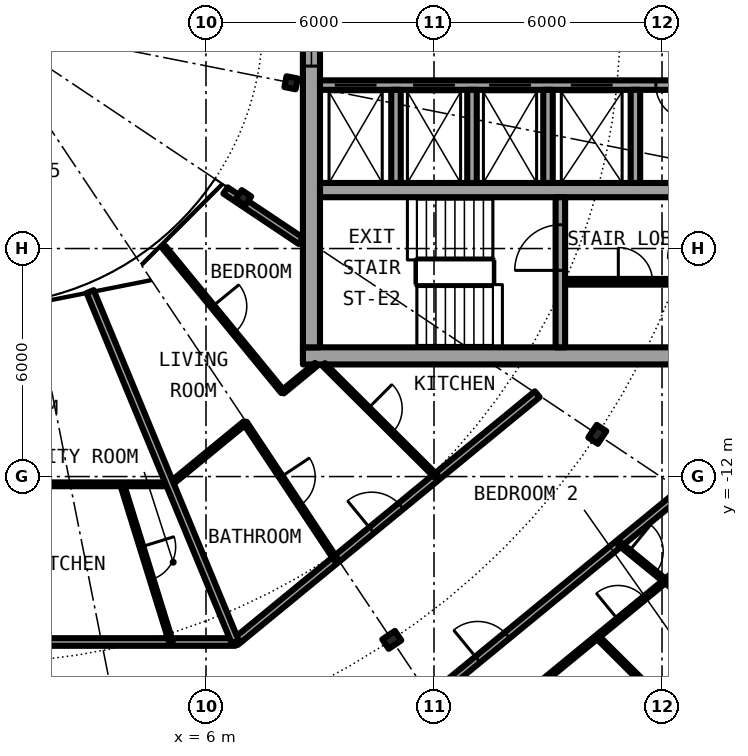
"""IFC4 building model, lengths in metres.
Left out: names, types, materials, properties, quantities, classifications, styles, units other than length and angle.
Written with IfcOpenShell. Run it as: python <this file> out.ifc"""

import sys

from ifc_helpers import new_model, si_unit, direction, frame, frame_2d, origin, origin_2d, place, context, subcontext, project, spatial, rectangle, i_section, extrude, element, fill, save


model = new_model("IFC4")
c1 = context("Model", 3, precision=1e-05, world=origin(), true_north=direction((0.0, 1.0)))
c2 = subcontext(c1, "Body", "Model", "MODEL_VIEW")
j1 = project(units=[si_unit("LENGTHUNIT", "METRE"), si_unit("PLANEANGLEUNIT", "RADIAN")], contexts=[c1])
p1 = place(None, origin())
s1 = spatial("IfcSite", under=j1, at=p1, CompositionType="ELEMENT")
p2 = place(p1, origin())
s2 = spatial("IfcBuilding", under=s1, at=p2, CompositionType="ELEMENT")
p3 = place(p2, frame((0.0, 0.0, 202.4)))
s3 = spatial("IfcBuildingStorey", under=s2, at=p3, CompositionType="ELEMENT", Elevation=202.4)
for number, where, z_axis, x_axis in (
    (1, (10.889, -16.297, 0.0), (0.0, 0.0, 1.0), (0.556, -0.831, 0.0)),
    (2, (16.297, -10.889, 0.0), (0.0, 0.0, 1.0), (0.831, -0.556, 0.0)),
):
    element("IfcColumn", number, at=place(p3, frame(where, z_axis=z_axis, x_axis=x_axis)), inside=s3, PredefinedType="COLUMN", context=c2, shape_type="SweptSolid", body=[
        extrude(i_section(OverallWidth=0.3, OverallDepth=0.4, WebThickness=0.013, FlangeThickness=0.024, FilletRadius=0.027, at=origin_2d()), origin(), (0.0, 0.0, 1.0), 3.05),
    ])
for number, where, z_axis, x_axis in (
    (3, (6.984, -4.667, 0.0), (0.0, 0.0, 1.0), (0.831, -0.556, 0.0)),
    (4, (8.239, -1.639, 0.0), (0.0, 0.0, 1.0), (0.981, -0.195, 0.0)),
):
    element("IfcColumn", number, at=place(p3, frame(where, z_axis=z_axis, x_axis=x_axis)), inside=s3, PredefinedType="COLUMN", context=c2, shape_type="SweptSolid", body=[
        extrude(i_section(OverallWidth=0.3, OverallDepth=0.29, WebThickness=0.009, FlangeThickness=0.014, FilletRadius=0.027, at=origin_2d()), origin(), (0.0, 0.0, 1.0), 3.05),
    ])
p4 = place(p3, frame((8.55, -8.825, 0.0), z_axis=(0.0, 0.0, 1.0), x_axis=(1.0, 0.0, 0.0)))
e5 = element("IfcWall", 5, at=p4, inside=s3, PredefinedType="SHEAR", context=c2, shape_type="SweptSolid", body=[
    extrude(rectangle(XDim=13.5, YDim=0.45, at=frame_2d((6.75, 0.0))), origin(), (0.0, 0.0, 1.0), 3.05),
])
p5 = place(p4, frame((11.325, 0.0, 0.0)))
e6 = element("IfcOpeningElement", 6, at=p5, cuts=e5, PredefinedType="OPENING", context=c2, shape_type="SweptSolid", body=[
    extrude(rectangle(XDim=1.2, YDim=2.3, at=frame_2d((0.6, 1.15))), frame((0.0, 0.235, 0.0), z_axis=(0.0, -1.0, 0.0), x_axis=(1.0, 0.0, 0.0)), (0.0, 0.0, 1.0), 0.47),
])
p6 = place(p3, frame((8.775, -8.6, 0.0), z_axis=(0.0, 0.0, 1.0), x_axis=(0.0, 1.0, 0.0)))
e7 = element("IfcWall", 7, at=p6, inside=s3, PredefinedType="SHEAR", context=c2, shape_type="SweptSolid", body=[
    extrude(rectangle(XDim=17.2, YDim=0.45, at=frame_2d((8.6, 0.0))), origin(), (0.0, 0.0, 1.0), 3.05),
])
p7 = place(p6, frame((7.4, 0.0, 0.1)))
e8 = element("IfcOpeningElement", 8, at=p7, cuts=e7, PredefinedType="OPENING", context=c2, shape_type="SweptSolid", body=[
    extrude(rectangle(XDim=2.4, YDim=2.2, at=frame_2d((1.2, 1.1))), frame((0.0, 0.235, 0.0), z_axis=(0.0, -1.0, 0.0), x_axis=(1.0, 0.0, 0.0)), (0.0, 0.0, 1.0), 0.47),
])
p8 = place(p3, frame((19.15, -1.7, 0.0), z_axis=(0.0, 0.0, 1.0), x_axis=(-1.0, 0.0, 0.0)))
e9 = element("IfcWall", 9, at=p8, inside=s3, PredefinedType="SHEAR", context=c2, shape_type="SweptSolid", body=[
    extrude(rectangle(XDim=10.15, YDim=0.25, at=frame_2d((5.075, 0.0))), origin(), (0.0, 0.0, 1.0), 3.05),
])
p9 = place(p8, frame((8.663, 0.0, 0.0)))
e10 = element("IfcOpeningElement", 10, at=p9, cuts=e9, PredefinedType="OPENING", context=c2, shape_type="SweptSolid", body=[
    extrude(rectangle(XDim=1.1, YDim=2.3, at=frame_2d((0.55, 1.15))), frame((0.0, 0.135, 0.0), z_axis=(0.0, -1.0, 0.0), x_axis=(1.0, 0.0, 0.0)), (0.0, 0.0, 1.0), 0.27),
])
p10 = place(p8, frame((6.6, 0.0, 0.0)))
e11 = element("IfcOpeningElement", 11, at=p10, cuts=e9, PredefinedType="OPENING", context=c2, shape_type="SweptSolid", body=[
    extrude(rectangle(XDim=1.1, YDim=2.3, at=frame_2d((0.55, 1.15))), frame((0.0, 0.135, 0.0), z_axis=(0.0, -1.0, 0.0), x_axis=(1.0, 0.0, 0.0)), (0.0, 0.0, 1.0), 0.27),
])
p11 = place(p8, frame((4.6, 0.0, 0.0)))
e12 = element("IfcOpeningElement", 12, at=p11, cuts=e9, PredefinedType="OPENING", context=c2, shape_type="SweptSolid", body=[
    extrude(rectangle(XDim=1.1, YDim=2.3, at=frame_2d((0.55, 1.15))), frame((0.0, 0.135, 0.0), z_axis=(0.0, -1.0, 0.0), x_axis=(1.0, 0.0, 0.0)), (0.0, 0.0, 1.0), 0.27),
])
p12 = place(p8, frame((2.45, 0.0, 0.0)))
e13 = element("IfcOpeningElement", 13, at=p12, cuts=e9, PredefinedType="OPENING", context=c2, shape_type="SweptSolid", body=[
    extrude(rectangle(XDim=1.1, YDim=2.3, at=frame_2d((0.55, 1.15))), frame((0.0, 0.135, 0.0), z_axis=(0.0, -1.0, 0.0), x_axis=(1.0, 0.0, 0.0)), (0.0, 0.0, 1.0), 0.27),
])
p13 = place(p8, frame((0.413, 0.0, 0.0)))
e14 = element("IfcOpeningElement", 14, at=p13, cuts=e9, PredefinedType="OPENING", context=c2, shape_type="SweptSolid", body=[
    extrude(rectangle(XDim=0.9, YDim=2.3, at=frame_2d((0.45, 1.15))), frame((0.0, 0.135, 0.0), z_axis=(0.0, -1.0, 0.0), x_axis=(1.0, 0.0, 0.0)), (0.0, 0.0, 1.0), 0.27),
])
p14 = place(p3, frame((9.0, -4.462, 0.0), z_axis=(0.0, 0.0, 1.0), x_axis=(1.0, 0.0, 0.0)))
e15 = element("IfcWall", 15, at=p14, inside=s3, PredefinedType="SHEAR", context=c2, shape_type="SweptSolid", body=[
    extrude(rectangle(XDim=10.15, YDim=0.375, at=frame_2d((5.075, 0.0))), origin(), (0.0, 0.0, 1.0), 3.05),
])
p15 = place(p3, frame((15.325, -8.6, 0.0), z_axis=(0.0, 0.0, 1.0), x_axis=(0.0, 1.0, 0.0)))
e16 = element("IfcWall", 16, at=p15, inside=s3, PredefinedType="SHEAR", context=c2, shape_type="SweptSolid", body=[
    extrude(rectangle(XDim=3.95, YDim=0.25, at=frame_2d((1.975, 0.0))), origin(), (0.0, 0.0, 1.0), 3.05),
])
p16 = place(p15, frame((2.025, 0.0, 0.0)))
e17 = element("IfcOpeningElement", 17, at=p16, cuts=e16, PredefinedType="OPENING", context=c2, shape_type="SweptSolid", body=[
    extrude(rectangle(XDim=1.2, YDim=2.3, at=frame_2d((0.6, 1.15))), frame((0.0, 0.135, 0.0), z_axis=(0.0, -1.0, 0.0), x_axis=(1.0, 0.0, 0.0)), (0.0, 0.0, 1.0), 0.27),
])
for number, where, z_axis, x_axis in (
    (18, (15.0, -1.825, 0.0), (0.0, 0.0, 1.0), (0.0, -1.0, 0.0)),
    (19, (17.3, -1.825, 0.0), (0.0, 0.0, 1.0), (0.0, -1.0, 0.0)),
    (20, (11.0, -1.825, 0.0), (0.0, 0.0, 1.0), (0.0, -1.0, 0.0)),
    (21, (13.0, -1.825, 0.0), (0.0, 0.0, 1.0), (0.0, -1.0, 0.0)),
):
    element("IfcWall", number, at=place(p3, frame(where, z_axis=z_axis, x_axis=x_axis)), inside=s3, PredefinedType="SOLIDWALL", context=c2, shape_type="SweptSolid", body=[
        extrude(rectangle(XDim=2.45, YDim=0.25, at=frame_2d((1.225, 0.0))), origin(), (0.0, 0.0, 1.0), 2.7),
    ])
p17 = place(p3, frame((15.45, -6.875, 0.0), z_axis=(0.0, 0.0, 1.0), x_axis=(1.0, 0.0, 0.0)))
e22 = element("IfcWall", 22, at=p17, inside=s3, PredefinedType="PARTITIONING", context=c2, shape_type="SweptSolid", body=[
    extrude(rectangle(XDim=3.7, YDim=0.15, at=frame_2d((1.85, 0.0))), origin(), (0.0, 0.0, 1.0), 2.7),
])
p18 = place(p17, frame((1.4, 0.0, 0.0)))
e23 = element("IfcOpeningElement", 23, at=p18, cuts=e22, PredefinedType="OPENING", context=c2, shape_type="SweptSolid", body=[
    extrude(rectangle(XDim=0.9, YDim=2.3, at=frame_2d((0.45, 1.15))), frame((0.0, 0.085, 0.0), z_axis=(0.0, -1.0, 0.0), x_axis=(1.0, 0.0, 0.0)), (0.0, 0.0, 1.0), 0.17),
])
p19 = place(p3, frame((14.507, -17.682, 0.0), z_axis=(0.0, 0.0, 1.0), x_axis=(0.773143248755, 0.634231437966, 0.0)))
e24 = element("IfcWall", 24, at=p19, inside=s3, PredefinedType="PARTITIONING", context=c2, shape_type="SweptSolid", body=[
    extrude(rectangle(XDim=6.94, YDim=0.1, at=frame_2d((3.47, 0.0))), origin(), (0.0, 0.0, 1.0), 2.7),
])
p20 = place(p19, frame((3.021, 0.0, 0.0)))
e25 = element("IfcOpeningElement", 25, at=p20, cuts=e24, PredefinedType="OPENING", context=c2, shape_type="SweptSolid", body=[
    extrude(rectangle(XDim=0.9, YDim=2.3, at=frame_2d((0.45, 1.15))), frame((0.0, 0.06, 0.0), z_axis=(0.0, -1.0, 0.0), x_axis=(1.0, 0.0, 0.0)), (0.0, 0.0, 1.0), 0.12),
])
p21 = place(p3, frame((8.534, -20.603, 0.0), z_axis=(0.0, 0.0, 1.0), x_axis=(0.772983503654, 0.634426121056, 0.0)))
e26 = element("IfcWall", 26, at=p21, inside=s3, PredefinedType="PARTITIONING", context=c2, shape_type="SweptSolid", body=[
    extrude(rectangle(XDim=12.947, YDim=0.2, at=frame_2d((6.474, 0.0))), origin(), (0.0, 0.0, 1.0), 2.7),
])
p22 = place(p21, frame((5.974, 0.0, 0.0)))
e27 = element("IfcOpeningElement", 27, at=p22, cuts=e26, PredefinedType="OPENING", context=c2, shape_type="SweptSolid", body=[
    extrude(rectangle(XDim=1.0, YDim=2.3, at=frame_2d((0.5, 1.15))), frame((0.0, 0.11, 0.0), z_axis=(0.0, -1.0, 0.0), x_axis=(1.0, 0.0, 0.0)), (0.0, 0.0, 1.0), 0.22),
])
p23 = place(p3, frame((6.773, -16.353, 0.0), z_axis=(0.0, 0.0, 1.0), x_axis=(0.773034536097, 0.634363938131, 0.0)))
e28 = element("IfcWall", 28, at=p23, inside=s3, PredefinedType="PARTITIONING", context=c2, shape_type="SweptSolid", body=[
    extrude(rectangle(XDim=10.277, YDim=0.2, at=frame_2d((5.138, 0.0))), origin(), (0.0, 0.0, 1.0), 2.7),
])
p24 = place(p23, frame((4.638, 0.0, 0.0)))
e29 = element("IfcOpeningElement", 29, at=p24, cuts=e28, PredefinedType="OPENING", context=c2, shape_type="SweptSolid", body=[
    extrude(rectangle(XDim=1.0, YDim=2.3, at=frame_2d((0.5, 1.15))), frame((0.0, 0.11, 0.0), z_axis=(0.0, -1.0, 0.0), x_axis=(1.0, 0.0, 0.0)), (0.0, 0.0, 1.0), 0.22),
])
p25 = place(p3, frame((-6.773, -16.353, 0.0), z_axis=(0.0, 0.0, 1.0), x_axis=(1.0, 0.0, 0.0)))
e30 = element("IfcWall", 30, at=p25, inside=s3, PredefinedType="PARTITIONING", context=c2, shape_type="SweptSolid", body=[
    extrude(rectangle(XDim=13.546, YDim=0.2, at=frame_2d((6.773, 0.0))), origin(), (0.0, 0.0, 1.0), 2.7),
])
p26 = place(p25, frame((4.579, 0.0, 0.0)))
e31 = element("IfcOpeningElement", 31, at=p26, cuts=e30, PredefinedType="OPENING", context=c2, shape_type="SweptSolid", body=[
    extrude(rectangle(XDim=1.0, YDim=2.3, at=frame_2d((0.5, 1.15))), frame((0.0, 0.11, 0.0), z_axis=(0.0, -1.0, 0.0), x_axis=(1.0, 0.0, 0.0)), (0.0, 0.0, 1.0), 0.22),
])
p27 = place(p3, frame((5.055, -12.204, 0.0), z_axis=(0.0, 0.0, 1.0), x_axis=(0.772943675046, 0.634474645046, 0.0)))
e32 = element("IfcWall", 32, at=p27, inside=s3, PredefinedType="PARTITIONING", context=c2, shape_type="SweptSolid", body=[
    extrude(rectangle(XDim=2.557, YDim=0.1, at=frame_2d((1.278, 0.0))), origin(), (0.0, 0.0, 1.0), 2.7),
])
p28 = place(p3, frame((8.017, -9.773, 0.0), z_axis=(0.0, 0.0, 1.0), x_axis=(0.772786083133, 0.634666581534, 0.0)))
e33 = element("IfcWall", 33, at=p28, inside=s3, PredefinedType="PARTITIONING", context=c2, shape_type="SweptSolid", body=[
    extrude(rectangle(XDim=1.144, YDim=0.1, at=frame_2d((0.572, 0.0))), origin(), (0.0, 0.0, 1.0), 2.7),
])
p29 = place(p3, frame((-1.264, -12.204, 0.0), z_axis=(0.0, 0.0, 1.0), x_axis=(1.0, 0.0, 0.0)))
e34 = element("IfcWall", 34, at=p29, inside=s3, PredefinedType="PARTITIONING", context=c2, shape_type="SweptSolid", body=[
    extrude(rectangle(XDim=6.319, YDim=0.1, at=frame_2d((3.159, 0.0))), origin(), (0.0, 0.0, 1.0), 2.7),
])
p30 = place(p3, frame((6.513, -4.472, 0.0), z_axis=(0.0, 0.0, 1.0), x_axis=(0.831403409976, -0.555669299026, 0.0)))
e35 = element("IfcWall", 35, at=p30, inside=s3, PredefinedType="PARTITIONING", context=c2, shape_type="SweptSolid", body=[
    extrude(rectangle(XDim=2.383, YDim=0.2, at=frame_2d((1.191, 0.0))), origin(), (0.0, 0.0, 1.0), 2.7),
])
p31 = place(p3, frame((2.952, -7.133, 0.0), z_axis=(0.0, 0.0, 1.0), x_axis=(0.382570007985, -0.923926506271, 0.0)))
e36 = element("IfcWall", 36, at=p31, inside=s3, PredefinedType="PARTITIONING", context=c2, shape_type="SweptSolid", body=[
    extrude(rectangle(XDim=9.98, YDim=0.2, at=frame_2d((4.99, 0.0))), origin(), (0.0, 0.0, 1.0), 2.7),
])
p32 = place(p3, frame((3.791, -12.204, 0.0), z_axis=(0.0, 0.0, 1.0), x_axis=(0.29670674532, -0.954968642041, 0.0)))
e37 = element("IfcWall", 37, at=p32, inside=s3, PredefinedType="PARTITIONING", context=c2, shape_type="SweptSolid", body=[
    extrude(rectangle(XDim=4.344, YDim=0.1, at=frame_2d((2.172, 0.0))), origin(), (0.0, 0.0, 1.0), 2.7),
])
p33 = place(p32, frame((1.722, 0.0, 0.0)))
e38 = element("IfcOpeningElement", 38, at=p33, cuts=e37, PredefinedType="OPENING", context=c2, shape_type="SweptSolid", body=[
    extrude(rectangle(XDim=0.9, YDim=2.3, at=frame_2d((0.45, 1.15))), frame((0.0, 0.06, 0.0), z_axis=(0.0, -1.0, 0.0), x_axis=(1.0, 0.0, 0.0)), (0.0, 0.0, 1.0), 0.12),
])
p34 = place(p3, frame((4.898, -5.968, 0.0), z_axis=(0.0, 0.0, 1.0), x_axis=(0.634401778971, -0.773003481776, 0.0)))
e39 = element("IfcWall", 39, at=p34, inside=s3, PredefinedType="PARTITIONING", context=c2, shape_type="SweptSolid", body=[
    extrude(rectangle(XDim=4.92, YDim=0.1, at=frame_2d((2.46, 0.0))), origin(), (0.0, 0.0, 1.0), 2.7),
])
p35 = place(p34, frame((2.01, 0.0, 0.0)))
e40 = element("IfcOpeningElement", 40, at=p35, cuts=e39, PredefinedType="OPENING", context=c2, shape_type="SweptSolid", body=[
    extrude(rectangle(XDim=0.9, YDim=2.3, at=frame_2d((0.45, 1.15))), frame((0.0, 0.06, 0.0), z_axis=(0.0, -1.0, 0.0), x_axis=(1.0, 0.0, 0.0)), (0.0, 0.0, 1.0), 0.12),
])
p36 = place(p3, frame((7.028, -10.584, 0.0), z_axis=(0.0, 0.0, 1.0), x_axis=(0.553303732327, -0.832979579457, 0.0)))
e41 = element("IfcWall", 41, at=p36, inside=s3, PredefinedType="PARTITIONING", context=c2, shape_type="SweptSolid", body=[
    extrude(rectangle(XDim=4.319, YDim=0.1, at=frame_2d((2.16, 0.0))), origin(), (0.0, 0.0, 1.0), 2.7),
])
p37 = place(p36, frame((1.71, 0.0, 0.0)))
e42 = element("IfcOpeningElement", 42, at=p37, cuts=e41, PredefinedType="OPENING", context=c2, shape_type="SweptSolid", body=[
    extrude(rectangle(XDim=0.9, YDim=2.3, at=frame_2d((0.45, 1.15))), frame((0.0, 0.06, 0.0), z_axis=(0.0, -1.0, 0.0), x_axis=(1.0, 0.0, 0.0)), (0.0, 0.0, 1.0), 0.12),
])
p38 = place(p3, frame((9.096, -9.051, 0.0), z_axis=(0.0, 0.0, 1.0), x_axis=(0.708909651863, -0.705299302067, 0.0)))
e43 = element("IfcWall", 43, at=p38, inside=s3, PredefinedType="PARTITIONING", context=c2, shape_type="SweptSolid", body=[
    extrude(rectangle(XDim=4.193, YDim=0.1, at=frame_2d((2.096, 0.0))), origin(), (0.0, 0.0, 1.0), 2.7),
])
p39 = place(p38, frame((1.646, 0.0, 0.0)))
e44 = element("IfcOpeningElement", 44, at=p39, cuts=e43, PredefinedType="OPENING", context=c2, shape_type="SweptSolid", body=[
    extrude(rectangle(XDim=0.9, YDim=2.3, at=frame_2d((0.45, 1.15))), frame((0.0, 0.06, 0.0), z_axis=(0.0, -1.0, 0.0), x_axis=(1.0, 0.0, 0.0)), (0.0, 0.0, 1.0), 0.12),
])
p40 = place(p3, frame((16.295, -16.214, 0.0), z_axis=(0.0, 0.0, 1.0), x_axis=(0.709028177231, -0.705180149956, 0.0)))
e45 = element("IfcWall", 45, at=p40, inside=s3, PredefinedType="PARTITIONING", context=c2, shape_type="SweptSolid", body=[
    extrude(rectangle(XDim=4.188, YDim=0.1, at=frame_2d((2.094, 0.0))), origin(), (0.0, 0.0, 1.0), 2.7),
])
p41 = place(p3, frame((16.874, -13.758, 0.0), z_axis=(0.0, 0.0, 1.0), x_axis=(0.774926754572, -0.632051046236, 0.0)))
e46 = element("IfcWall", 46, at=p41, inside=s3, PredefinedType="PARTITIONING", context=c2, shape_type="SweptSolid", body=[
    extrude(rectangle(XDim=5.403, YDim=0.1, at=frame_2d((2.702, 0.0))), origin(), (0.0, 0.0, 1.0), 2.7),
])
p42 = place(p41, frame((0.331, 0.0, 0.0)))
e47 = element("IfcOpeningElement", 47, at=p42, cuts=e46, PredefinedType="OPENING", context=c2, shape_type="SweptSolid", body=[
    extrude(rectangle(XDim=0.9, YDim=2.3, at=frame_2d((0.45, 1.15))), frame((0.0, 0.06, 0.0), z_axis=(0.0, -1.0, 0.0), x_axis=(1.0, 0.0, 0.0)), (0.0, 0.0, 1.0), 0.12),
])
p43 = place(p41, frame((3.032, 0.0, 0.0)))
e48 = element("IfcOpeningElement", 48, at=p43, cuts=e46, PredefinedType="OPENING", context=c2, shape_type="SweptSolid", body=[
    extrude(rectangle(XDim=0.9, YDim=2.3, at=frame_2d((0.45, 1.15))), frame((0.0, 0.06, 0.0), z_axis=(0.0, -1.0, 0.0), x_axis=(1.0, 0.0, 0.0)), (0.0, 0.0, 1.0), 0.12),
])
p44 = place(p9, origin())
e49 = element("IfcDoor", 49, at=p44, inside=s3, OperationType="DOUBLE_DOOR_SLIDING", PredefinedType="DOOR", context=c2, shape_type="SweptSolid", body=[
    extrude(rectangle(XDim=1.1, YDim=2.3, at=frame_2d((0.55, 1.15))), frame((0.0, 0.025, 0.0), z_axis=(0.0, -1.0, 0.0), x_axis=(1.0, 0.0, 0.0)), (0.0, 0.0, 1.0), 0.05),
])
fill(e10, e49)
p45 = place(p10, origin())
e50 = element("IfcDoor", 50, at=p45, inside=s3, OperationType="DOUBLE_DOOR_SLIDING", PredefinedType="DOOR", context=c2, shape_type="SweptSolid", body=[
    extrude(rectangle(XDim=1.1, YDim=2.3, at=frame_2d((0.55, 1.15))), frame((0.0, 0.025, 0.0), z_axis=(0.0, -1.0, 0.0), x_axis=(1.0, 0.0, 0.0)), (0.0, 0.0, 1.0), 0.05),
])
fill(e11, e50)
p46 = place(p11, origin())
e51 = element("IfcDoor", 51, at=p46, inside=s3, OperationType="DOUBLE_DOOR_SLIDING", PredefinedType="DOOR", context=c2, shape_type="SweptSolid", body=[
    extrude(rectangle(XDim=1.1, YDim=2.3, at=frame_2d((0.55, 1.15))), frame((0.0, 0.025, 0.0), z_axis=(0.0, -1.0, 0.0), x_axis=(1.0, 0.0, 0.0)), (0.0, 0.0, 1.0), 0.05),
])
fill(e12, e51)
p47 = place(p12, origin())
e52 = element("IfcDoor", 52, at=p47, inside=s3, OperationType="DOUBLE_DOOR_SLIDING", PredefinedType="DOOR", context=c2, shape_type="SweptSolid", body=[
    extrude(rectangle(XDim=1.1, YDim=2.3, at=frame_2d((0.55, 1.15))), frame((0.0, 0.025, 0.0), z_axis=(0.0, -1.0, 0.0), x_axis=(1.0, 0.0, 0.0)), (0.0, 0.0, 1.0), 0.05),
])
fill(e13, e52)
p48 = place(p13, origin())
e53 = element("IfcDoor", 53, at=p48, inside=s3, OperationType="SINGLE_SWING_RIGHT", PredefinedType="DOOR", context=c2, shape_type="SweptSolid", body=[
    extrude(rectangle(XDim=0.9, YDim=2.3, at=frame_2d((0.45, 1.15))), frame((0.0, 0.025, 0.0), z_axis=(0.0, -1.0, 0.0), x_axis=(1.0, 0.0, 0.0)), (0.0, 0.0, 1.0), 0.05),
])
fill(e14, e53)
p49 = place(p18, origin())
e54 = element("IfcDoor", 54, at=p49, inside=s3, OperationType="SINGLE_SWING_LEFT", PredefinedType="DOOR", context=c2, shape_type="SweptSolid", body=[
    extrude(rectangle(XDim=0.9, YDim=2.3, at=frame_2d((0.45, 1.15))), frame((0.0, 0.025, 0.0), z_axis=(0.0, -1.0, 0.0), x_axis=(1.0, 0.0, 0.0)), (0.0, 0.0, 1.0), 0.05),
])
fill(e23, e54)
p50 = place(p16, origin())
e55 = element("IfcDoor", 55, at=p50, inside=s3, OperationType="SINGLE_SWING_LEFT", PredefinedType="DOOR", context=c2, shape_type="SweptSolid", body=[
    extrude(rectangle(XDim=1.2, YDim=2.3, at=frame_2d((0.6, 1.15))), frame((0.0, 0.025, 0.0), z_axis=(0.0, -1.0, 0.0), x_axis=(1.0, 0.0, 0.0)), (0.0, 0.0, 1.0), 0.05),
])
fill(e17, e55)
p51 = place(p7, origin())
e56 = element("IfcWindow", 56, at=p51, inside=s3, PartitioningType="SINGLE_PANEL", PredefinedType="WINDOW", context=c2, shape_type="SweptSolid", body=[
    extrude(rectangle(XDim=2.4, YDim=2.2, at=frame_2d((1.2, 1.1))), frame((0.0, 0.03, 0.0), z_axis=(0.0, -1.0, 0.0), x_axis=(1.0, 0.0, 0.0)), (0.0, 0.0, 1.0), 0.06),
])
fill(e8, e56)
p52 = place(p22, origin())
e57 = element("IfcDoor", 57, at=p52, inside=s3, OperationType="SINGLE_SWING_LEFT", PredefinedType="DOOR", context=c2, shape_type="SweptSolid", body=[
    extrude(rectangle(XDim=1.0, YDim=2.3, at=frame_2d((0.5, 1.15))), frame((0.0, 0.025, 0.0), z_axis=(0.0, -1.0, 0.0), x_axis=(1.0, 0.0, 0.0)), (0.0, 0.0, 1.0), 0.05),
])
fill(e27, e57)
p53 = place(p42, origin())
e58 = element("IfcDoor", 58, at=p53, inside=s3, OperationType="SINGLE_SWING_LEFT", PredefinedType="DOOR", context=c2, shape_type="SweptSolid", body=[
    extrude(rectangle(XDim=0.9, YDim=2.3, at=frame_2d((0.45, 1.15))), frame((0.0, 0.025, 0.0), z_axis=(0.0, -1.0, 0.0), x_axis=(1.0, 0.0, 0.0)), (0.0, 0.0, 1.0), 0.05),
])
fill(e47, e58)
p54 = place(p20, origin())
e59 = element("IfcDoor", 59, at=p54, inside=s3, OperationType="SINGLE_SWING_RIGHT", PredefinedType="DOOR", context=c2, shape_type="SweptSolid", body=[
    extrude(rectangle(XDim=0.9, YDim=2.3, at=frame_2d((0.45, 1.15))), frame((0.0, 0.025, 0.0), z_axis=(0.0, -1.0, 0.0), x_axis=(1.0, 0.0, 0.0)), (0.0, 0.0, 1.0), 0.05),
])
fill(e25, e59)
p55 = place(p33, origin())
e60 = element("IfcDoor", 60, at=p55, inside=s3, OperationType="SINGLE_SWING_RIGHT", PredefinedType="DOOR", context=c2, shape_type="SweptSolid", body=[
    extrude(rectangle(XDim=0.9, YDim=2.3, at=frame_2d((0.45, 1.15))), frame((0.0, 0.025, 0.0), z_axis=(0.0, -1.0, 0.0), x_axis=(1.0, 0.0, 0.0)), (0.0, 0.0, 1.0), 0.05),
])
fill(e38, e60)
p56 = place(p24, origin())
e61 = element("IfcDoor", 61, at=p56, inside=s3, OperationType="SINGLE_SWING_RIGHT", PredefinedType="DOOR", context=c2, shape_type="SweptSolid", body=[
    extrude(rectangle(XDim=1.0, YDim=2.3, at=frame_2d((0.5, 1.15))), frame((0.0, 0.025, 0.0), z_axis=(0.0, -1.0, 0.0), x_axis=(1.0, 0.0, 0.0)), (0.0, 0.0, 1.0), 0.05),
])
fill(e29, e61)
p57 = place(p37, origin())
e62 = element("IfcDoor", 62, at=p57, inside=s3, OperationType="SINGLE_SWING_LEFT", PredefinedType="DOOR", context=c2, shape_type="SweptSolid", body=[
    extrude(rectangle(XDim=0.9, YDim=2.3, at=frame_2d((0.45, 1.15))), frame((0.0, 0.025, 0.0), z_axis=(0.0, -1.0, 0.0), x_axis=(1.0, 0.0, 0.0)), (0.0, 0.0, 1.0), 0.05),
])
fill(e42, e62)
p58 = place(p39, origin())
e63 = element("IfcDoor", 63, at=p58, inside=s3, OperationType="SINGLE_SWING_RIGHT", PredefinedType="DOOR", context=c2, shape_type="SweptSolid", body=[
    extrude(rectangle(XDim=0.9, YDim=2.3, at=frame_2d((0.45, 1.15))), frame((0.0, 0.025, 0.0), z_axis=(0.0, -1.0, 0.0), x_axis=(1.0, 0.0, 0.0)), (0.0, 0.0, 1.0), 0.05),
])
fill(e44, e63)
p59 = place(p35, origin())
e64 = element("IfcDoor", 64, at=p59, inside=s3, OperationType="SINGLE_SWING_RIGHT", PredefinedType="DOOR", context=c2, shape_type="SweptSolid", body=[
    extrude(rectangle(XDim=0.9, YDim=2.3, at=frame_2d((0.45, 1.15))), frame((0.0, 0.025, 0.0), z_axis=(0.0, -1.0, 0.0), x_axis=(1.0, 0.0, 0.0)), (0.0, 0.0, 1.0), 0.05),
])
fill(e40, e64)
save(model, sys.argv[1])
